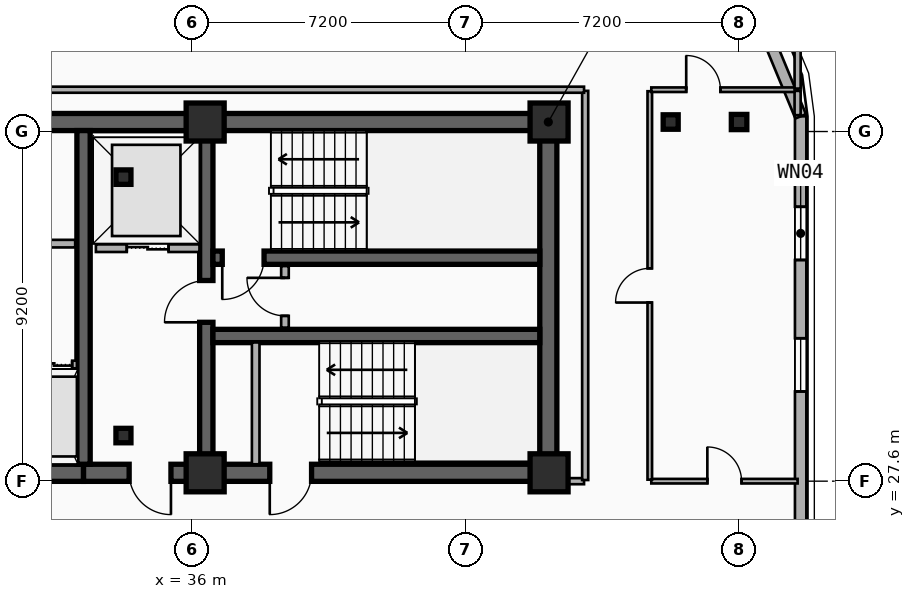
"""IFC4 building model, lengths in metres.
Left out: names, types, materials, properties, quantities, classifications, styles, units other than length and angle.
Written with IfcOpenShell. Run it as: python <this file> out.ifc"""

import sys

from ifc_helpers import new_model, si_unit, direction, frame, frame_2d, origin, origin_2d, place, context, subcontext, project, spatial, rectangle, i_section, extrude, element, fill, save


model = new_model("IFC4")
c1 = context("Model", 3, precision=1e-05, world=origin(), true_north=direction((0.0, 1.0)))
c2 = subcontext(c1, "Body", "Model", "MODEL_VIEW")
j1 = project(units=[si_unit("LENGTHUNIT", "METRE"), si_unit("PLANEANGLEUNIT", "RADIAN")], contexts=[c1])
p1 = place(None, origin())
s1 = spatial("IfcSite", under=j1, at=p1, CompositionType="ELEMENT")
p2 = place(p1, origin())
s2 = spatial("IfcBuilding", under=s1, at=p2, CompositionType="ELEMENT")
p3 = place(p2, frame((0.0, 0.0, 236.4)))
s3 = spatial("IfcBuildingStorey", under=s2, at=p3, CompositionType="ELEMENT", Elevation=236.4)
p4 = place(p3, frame((12.15, 37.05, 0.0), z_axis=(0.0, 0.0, 1.0), x_axis=(1.0, 0.0, 0.0)))
e1 = element("IfcWall", 1, at=p4, inside=s3, PredefinedType="SHEAR", context=c2, shape_type="SweptSolid", body=[
    extrude(rectangle(XDim=33.23, YDim=0.45, at=frame_2d((16.615, 0.0))), origin(), (0.0, 0.0, 1.0), 3.6),
])
p5 = place(p3, frame((33.15, 27.82, 0.0), z_axis=(0.0, 0.0, 1.0), x_axis=(-1.0, 0.0, 0.0)))
e2 = element("IfcWall", 2, at=p5, inside=s3, PredefinedType="SHEAR", context=c2, shape_type="SweptSolid", body=[
    extrude(rectangle(XDim=11.97, YDim=0.45, at=frame_2d((5.985, 0.0))), origin(), (0.0, 0.0, 1.0), 3.6),
])
p6 = place(p5, frame((6.1, 0.0, 0.0)))
e3 = element("IfcOpeningElement", 3, at=p6, cuts=e2, PredefinedType="OPENING", context=c2, shape_type="SweptSolid", body=[
    extrude(rectangle(XDim=1.6, YDim=2.2, at=frame_2d((0.8, 1.1))), frame((0.0, 0.235, 0.0), z_axis=(0.0, -1.0, 0.0), x_axis=(1.0, 0.0, 0.0)), (0.0, 0.0, 1.0), 0.47),
])
p7 = place(p3, frame((45.38, 27.82, 0.0), z_axis=(0.0, 0.0, 1.0), x_axis=(-1.0, 0.0, 0.0)))
e4 = element("IfcWall", 4, at=p7, inside=s3, PredefinedType="SHEAR", context=c2, shape_type="SweptSolid", body=[
    extrude(rectangle(XDim=12.23, YDim=0.45, at=frame_2d((6.115, 0.0))), origin(), (0.0, 0.0, 1.0), 3.6),
])
p8 = place(p7, frame((9.93, 0.0, 0.0)))
e5 = element("IfcOpeningElement", 5, at=p8, cuts=e4, PredefinedType="OPENING", context=c2, shape_type="SweptSolid", body=[
    extrude(rectangle(XDim=1.1, YDim=2.15, at=frame_2d((0.55, 1.075))), frame((0.0, 0.235, 0.0), z_axis=(0.0, -1.0, 0.0), x_axis=(1.0, 0.0, 0.0)), (0.0, 0.0, 1.0), 0.47),
])
p9 = place(p7, frame((6.23, 0.0, 0.0)))
e6 = element("IfcOpeningElement", 6, at=p9, cuts=e4, PredefinedType="OPENING", context=c2, shape_type="SweptSolid", body=[
    extrude(rectangle(XDim=1.1, YDim=2.15, at=frame_2d((0.55, 1.075))), frame((0.0, 0.235, 0.0), z_axis=(0.0, -1.0, 0.0), x_axis=(1.0, 0.0, 0.0)), (0.0, 0.0, 1.0), 0.47),
])
p10 = place(p3, frame((45.38, 28.045, 0.0), z_axis=(0.0, 0.0, 1.0), x_axis=(0.0, 1.0, 0.0)))
e7 = element("IfcWall", 7, at=p10, inside=s3, PredefinedType="SHEAR", context=c2, shape_type="SweptSolid", body=[
    extrude(rectangle(XDim=8.78, YDim=0.45, at=frame_2d((4.39, 0.0))), origin(), (0.0, 0.0, 1.0), 3.6),
])
p11 = place(p3, frame((33.15, 28.045, 0.0), z_axis=(0.0, 0.0, 1.0), x_axis=(0.0, 1.0, 0.0)))
e8 = element("IfcWall", 8, at=p11, inside=s3, PredefinedType="SHEAR", context=c2, shape_type="SweptSolid", body=[
    extrude(rectangle(XDim=8.78, YDim=0.35, at=frame_2d((4.39, 0.0))), origin(), (0.0, 0.0, 1.0), 3.6),
])
p12 = place(p3, frame((36.38, 28.045, 0.0), z_axis=(0.0, 0.0, 1.0), x_axis=(0.0, 1.0, 0.0)))
e9 = element("IfcWall", 9, at=p12, inside=s3, PredefinedType="SHEAR", context=c2, shape_type="SweptSolid", body=[
    extrude(rectangle(XDim=8.78, YDim=0.35, at=frame_2d((4.39, 0.0))), origin(), (0.0, 0.0, 1.0), 3.6),
])
p13 = place(p12, frame((3.735, 0.0, 0.0)))
e10 = element("IfcOpeningElement", 10, at=p13, cuts=e9, PredefinedType="OPENING", context=c2, shape_type="SweptSolid", body=[
    extrude(rectangle(XDim=1.1, YDim=2.15, at=frame_2d((0.55, 1.075))), frame((0.0, 0.185, 0.0), z_axis=(0.0, -1.0, 0.0), x_axis=(1.0, 0.0, 0.0)), (0.0, 0.0, 1.0), 0.37),
])
p14 = place(p3, frame((45.155, 33.48, 0.0), z_axis=(0.0, 0.0, 1.0), x_axis=(-1.0, 0.0, 0.0)))
e11 = element("IfcWall", 11, at=p14, inside=s3, PredefinedType="SHEAR", context=c2, shape_type="SweptSolid", body=[
    extrude(rectangle(XDim=8.6, YDim=0.35, at=frame_2d((4.3, 0.0))), origin(), (0.0, 0.0, 1.0), 3.6),
])
p15 = place(p14, frame((7.255, 0.0, 0.0)))
e12 = element("IfcOpeningElement", 12, at=p15, cuts=e11, PredefinedType="OPENING", context=c2, shape_type="SweptSolid", body=[
    extrude(rectangle(XDim=1.1, YDim=2.15, at=frame_2d((0.55, 1.075))), frame((0.0, 0.185, 0.0), z_axis=(0.0, -1.0, 0.0), x_axis=(1.0, 0.0, 0.0)), (0.0, 0.0, 1.0), 0.37),
])
p16 = place(p3, frame((36.555, 31.42, 0.0), z_axis=(0.0, 0.0, 1.0), x_axis=(1.0, 0.0, 0.0)))
e13 = element("IfcWall", 13, at=p16, inside=s3, PredefinedType="SHEAR", context=c2, shape_type="SweptSolid", body=[
    extrude(rectangle(XDim=8.6, YDim=0.35, at=frame_2d((4.3, 0.0))), origin(), (0.0, 0.0, 1.0), 3.6),
])
for number, where, z_axis, x_axis in (
    (14, (34.2, 28.8, 0.0), (0.0, 0.0, 1.0), (1.0, 0.0, 0.0)),
    (15, (34.2, 35.6, 0.0), (0.0, 0.0, 1.0), (1.0, 0.0, 0.0)),
):
    element("IfcColumn", number, at=place(p3, frame(where, z_axis=z_axis, x_axis=x_axis)), inside=s3, PredefinedType="COLUMN", context=c2, shape_type="SweptSolid", body=[
        extrude(i_section(OverallWidth=0.395, OverallDepth=0.38, WebThickness=0.019, FlangeThickness=0.03, FilletRadius=0.015, at=origin_2d()), origin(), (0.0, 0.0, 1.0), 3.6),
    ])
for number, where, z_axis, x_axis in (
    (16, (36.35, 27.82, 0.0), (0.0, 0.0, 1.0), (1.0, 0.0, 0.0)),
    (17, (36.35, 37.05, 0.0), (0.0, 0.0, 1.0), (1.0, 0.0, 0.0)),
    (18, (45.4, 27.82, 0.0), (0.0, 0.0, 1.0), (1.0, 0.0, 0.0)),
    (19, (45.4, 37.05, 0.0), (0.0, 0.0, 1.0), (1.0, 0.0, 0.0)),
):
    element("IfcColumn", number, at=place(p3, frame(where, z_axis=z_axis, x_axis=x_axis)), inside=s3, PredefinedType="COLUMN", context=c2, shape_type="SweptSolid", body=[
        extrude(rectangle(XDim=1.0, YDim=1.0, at=origin_2d()), origin(), (0.0, 0.0, 1.0), 3.6),
    ])
p17 = place(p3, frame((48.6, 37.05, 0.0), z_axis=(0.0, 0.0, 1.0), x_axis=(1.0, 0.0, 0.0)))
e20 = element("IfcColumn", 20, at=p17, inside=s3, PredefinedType="COLUMN", context=c2, shape_type="SweptSolid", body=[
    extrude(i_section(OverallWidth=0.395, OverallDepth=0.38, WebThickness=0.019, FlangeThickness=0.03, FilletRadius=0.015, at=origin_2d()), origin(), (0.0, 0.0, 1.0), 3.6),
])
p18 = place(p3, frame((50.4, 37.05, 0.0), z_axis=(0.0, 0.0, 1.0), x_axis=(1.0, 0.0, 0.0)))
e21 = element("IfcColumn", 21, at=p18, inside=s3, PredefinedType="COLUMN", context=c2, shape_type="SweptSolid", body=[
    extrude(i_section(OverallWidth=0.408, OverallDepth=0.4, WebThickness=0.025, FlangeThickness=0.039, FilletRadius=0.015, at=origin_2d()), origin(), (0.0, 0.0, 1.0), 3.6),
])
p19 = place(p3, frame((52.02, 37.2, 0.0), z_axis=(0.0, 0.0, 1.0), x_axis=(0.0, -1.0, 0.0)))
e22 = element("IfcWall", 22, at=p19, inside=s3, PredefinedType="SOLIDWALL", context=c2, shape_type="SweptSolid", body=[
    extrude(rectangle(XDim=28.6, YDim=0.3, at=frame_2d((14.3, 0.0))), origin(), (0.0, 0.0, 1.0), 3.34),
])
p20 = place(p19, frame((2.38, 0.0, 0.34)))
e23 = element("IfcOpeningElement", 23, at=p20, cuts=e22, PredefinedType="OPENING", context=c2, shape_type="SweptSolid", body=[
    extrude(rectangle(XDim=1.4, YDim=2.1, at=frame_2d((0.7, 1.05))), frame((0.0, 0.16, 0.0), z_axis=(0.0, -1.0, 0.0), x_axis=(1.0, 0.0, 0.0)), (0.0, 0.0, 1.0), 0.32),
])
p21 = place(p19, frame((5.84, 0.0, 0.34)))
e24 = element("IfcOpeningElement", 24, at=p21, cuts=e22, PredefinedType="OPENING", context=c2, shape_type="SweptSolid", body=[
    extrude(rectangle(XDim=1.4, YDim=2.1, at=frame_2d((0.7, 1.05))), frame((0.0, 0.16, 0.0), z_axis=(0.0, -1.0, 0.0), x_axis=(1.0, 0.0, 0.0)), (0.0, 0.0, 1.0), 0.32),
])
p22 = place(p19, frame((24.529, 0.0, 0.34)))
e25 = element("IfcOpeningElement", 25, at=p22, cuts=e22, PredefinedType="OPENING", context=c2, shape_type="SweptSolid", body=[
    extrude(rectangle(XDim=1.4, YDim=2.1, at=frame_2d((0.7, 1.05))), frame((0.0, 0.16, 0.0), z_axis=(0.0, -1.0, 0.0), x_axis=(1.0, 0.0, 0.0)), (0.0, 0.0, 1.0), 0.32),
])
p23 = place(p19, frame((20.521, 0.0, 0.34)))
e26 = element("IfcOpeningElement", 26, at=p23, cuts=e22, PredefinedType="OPENING", context=c2, shape_type="SweptSolid", body=[
    extrude(rectangle(XDim=1.4, YDim=2.1, at=frame_2d((0.7, 1.05))), frame((0.0, 0.16, 0.0), z_axis=(0.0, -1.0, 0.0), x_axis=(1.0, 0.0, 0.0)), (0.0, 0.0, 1.0), 0.32),
])
p24 = place(p19, frame((16.733, 0.0, 0.34)))
e27 = element("IfcOpeningElement", 27, at=p24, cuts=e22, PredefinedType="OPENING", context=c2, shape_type="SweptSolid", body=[
    extrude(rectangle(XDim=1.4, YDim=2.1, at=frame_2d((0.7, 1.05))), frame((0.0, 0.16, 0.0), z_axis=(0.0, -1.0, 0.0), x_axis=(1.0, 0.0, 0.0)), (0.0, 0.0, 1.0), 0.32),
])
p25 = place(p19, frame((12.945, 0.0, 0.34)))
e28 = element("IfcOpeningElement", 28, at=p25, cuts=e22, PredefinedType="OPENING", context=c2, shape_type="SweptSolid", body=[
    extrude(rectangle(XDim=1.4, YDim=2.1, at=frame_2d((0.7, 1.05))), frame((0.0, 0.16, 0.0), z_axis=(0.0, -1.0, 0.0), x_axis=(1.0, 0.0, 0.0)), (0.0, 0.0, 1.0), 0.32),
])
p26 = place(p3, frame((50.843, 40.042, 0.0), z_axis=(0.0, 0.0, 1.0), x_axis=(0.382704529509, -0.923870793506, 0.0)))
e29 = element("IfcWall", 29, at=p26, inside=s3, PredefinedType="SOLIDWALL", context=c2, shape_type="SweptSolid", body=[
    extrude(rectangle(XDim=3.077, YDim=0.3, at=frame_2d((1.538, 0.0))), origin(), (0.0, 0.0, 1.0), 3.34),
])
p27 = place(p3, frame((33.475, 33.73, 0.0), z_axis=(0.0, 0.0, 1.0), x_axis=(1.0, 0.0, 0.0)))
e30 = element("IfcWall", 30, at=p27, inside=s3, PredefinedType="PARTITIONING", context=c2, shape_type="SweptSolid", body=[
    extrude(rectangle(XDim=2.725, YDim=0.2, at=frame_2d((1.362, 0.0))), origin(), (0.0, 0.0, 1.0), 2.41),
])
p28 = place(p27, frame((0.812, 0.0, 0.0)))
e31 = element("IfcOpeningElement", 31, at=p28, cuts=e30, PredefinedType="OPENING", context=c2, shape_type="SweptSolid", body=[
    extrude(rectangle(XDim=1.1, YDim=2.15, at=frame_2d((0.55, 1.075))), frame((0.0, 0.11, 0.0), z_axis=(0.0, -1.0, 0.0), x_axis=(1.0, 0.0, 0.0)), (0.0, 0.0, 1.0), 0.22),
])
p29 = place(p3, frame((31.775, 30.67, 0.0), z_axis=(0.0, 0.0, 1.0), x_axis=(1.0, 0.0, 0.0)))
e32 = element("IfcWall", 32, at=p29, inside=s3, PredefinedType="PARTITIONING", context=c2, shape_type="SweptSolid", body=[
    extrude(rectangle(XDim=1.2, YDim=0.2, at=frame_2d((0.6, 0.0))), origin(), (0.0, 0.0, 1.0), 2.72),
])
p30 = place(p29, frame((0.125, 0.0, 0.0)))
e33 = element("IfcOpeningElement", 33, at=p30, cuts=e32, PredefinedType="OPENING", context=c2, shape_type="SweptSolid", body=[
    extrude(rectangle(XDim=0.95, YDim=2.15, at=frame_2d((0.475, 1.075))), frame((0.0, 0.11, 0.0), z_axis=(0.0, -1.0, 0.0), x_axis=(1.0, 0.0, 0.0)), (0.0, 0.0, 1.0), 0.22),
])
p31 = place(p3, frame((37.68, 28.045, 0.0), z_axis=(0.0, 0.0, 1.0), x_axis=(0.0, 1.0, 0.0)))
e34 = element("IfcWall", 34, at=p31, inside=s3, PredefinedType="PARTITIONING", context=c2, shape_type="SweptSolid", body=[
    extrude(rectangle(XDim=3.205, YDim=0.2, at=frame_2d((1.603, 0.0))), origin(), (0.0, 0.0, 1.0), 2.72),
])
p32 = place(p3, frame((38.45, 31.64, 0.0), z_axis=(0.0, 0.0, 1.0), x_axis=(0.0, 1.0, 0.0)))
e35 = element("IfcWall", 35, at=p32, inside=s3, PredefinedType="PARTITIONING", context=c2, shape_type="SweptSolid", body=[
    extrude(rectangle(XDim=1.62, YDim=0.2, at=frame_2d((0.81, 0.0))), origin(), (0.0, 0.0, 1.0), 3.34),
])
p33 = place(p32, frame((0.31, 0.0, 0.0)))
e36 = element("IfcOpeningElement", 36, at=p33, cuts=e35, PredefinedType="OPENING", context=c2, shape_type="SweptSolid", body=[
    extrude(rectangle(XDim=1.0, YDim=2.15, at=frame_2d((0.5, 1.075))), frame((0.0, 0.11, 0.0), z_axis=(0.0, -1.0, 0.0), x_axis=(1.0, 0.0, 0.0)), (0.0, 0.0, 1.0), 0.22),
])
p34 = place(p3, frame((21.59, 33.85, 0.0), z_axis=(0.0, 0.0, 1.0), x_axis=(1.0, 0.0, 0.0)))
e37 = element("IfcWall", 37, at=p34, inside=s3, PredefinedType="PARTITIONING", context=c2, shape_type="SweptSolid", body=[
    extrude(rectangle(XDim=11.34, YDim=0.2, at=frame_2d((5.67, 0.0))), origin(), (0.0, 0.0, 1.0), 2.41),
])
p35 = place(p34, frame((5.07, 0.0, 0.0)))
e38 = element("IfcOpeningElement", 38, at=p35, cuts=e37, PredefinedType="OPENING", context=c2, shape_type="SweptSolid", body=[
    extrude(rectangle(XDim=1.2, YDim=2.15, at=frame_2d((0.6, 1.075))), frame((0.0, 0.11, 0.0), z_axis=(0.0, -1.0, 0.0), x_axis=(1.0, 0.0, 0.0)), (0.0, 0.0, 1.0), 0.22),
])
p36 = place(p3, frame((48.09, 27.6, 0.0), z_axis=(0.0, 0.0, 1.0), x_axis=(1.0, 0.0, 0.0)))
e39 = element("IfcWall", 39, at=p36, inside=s3, PredefinedType="PARTITIONING", context=c2, shape_type="SweptSolid", body=[
    extrude(rectangle(XDim=3.85, YDim=0.12, at=frame_2d((1.925, 0.0))), origin(), (0.0, 0.0, 1.0), 2.67),
])
p37 = place(p36, frame((1.475, 0.0, 0.0)))
e40 = element("IfcOpeningElement", 40, at=p37, cuts=e39, PredefinedType="OPENING", context=c2, shape_type="SweptSolid", body=[
    extrude(rectangle(XDim=0.9, YDim=2.1, at=frame_2d((0.45, 1.05))), frame((0.0, 0.07, 0.0), z_axis=(0.0, -1.0, 0.0), x_axis=(1.0, 0.0, 0.0)), (0.0, 0.0, 1.0), 0.14),
])
p38 = place(p3, frame((48.05, 27.64, 0.0), z_axis=(0.0, 0.0, 1.0), x_axis=(0.0, 1.0, 0.0)))
e41 = element("IfcWall", 41, at=p38, inside=s3, PredefinedType="PARTITIONING", context=c2, shape_type="SweptSolid", body=[
    extrude(rectangle(XDim=10.22, YDim=0.12, at=frame_2d((5.11, 0.0))), origin(), (0.0, 0.0, 1.0), 2.82),
])
p39 = place(p38, frame((4.66, 0.0, 0.0)))
e42 = element("IfcOpeningElement", 42, at=p39, cuts=e41, PredefinedType="OPENING", context=c2, shape_type="SweptSolid", body=[
    extrude(rectangle(XDim=0.9, YDim=2.1, at=frame_2d((0.45, 1.05))), frame((0.0, 0.07, 0.0), z_axis=(0.0, -1.0, 0.0), x_axis=(1.0, 0.0, 0.0)), (0.0, 0.0, 1.0), 0.14),
])
p40 = place(p3, frame((48.09, 37.9, 0.0), z_axis=(0.0, 0.0, 1.0), x_axis=(1.0, 0.0, 0.0)))
e43 = element("IfcWall", 43, at=p40, inside=s3, PredefinedType="PARTITIONING", context=c2, shape_type="SweptSolid", body=[
    extrude(rectangle(XDim=3.85, YDim=0.12, at=frame_2d((1.925, 0.0))), origin(), (0.0, 0.0, 1.0), 3.34),
])
p41 = place(p40, frame((0.919, 0.0, 0.0)))
e44 = element("IfcOpeningElement", 44, at=p41, cuts=e43, PredefinedType="OPENING", context=c2, shape_type="SweptSolid", body=[
    extrude(rectangle(XDim=0.9, YDim=2.1, at=frame_2d((0.45, 1.05))), frame((0.0, 0.07, 0.0), z_axis=(0.0, -1.0, 0.0), x_axis=(1.0, 0.0, 0.0)), (0.0, 0.0, 1.0), 0.14),
])
p42 = place(p3, frame((45.41, 27.6, 0.0), z_axis=(0.0, 0.0, 1.0), x_axis=(1.0, 0.0, 0.0)))
e45 = element("IfcWall", 45, at=p42, inside=s3, PredefinedType="PARTITIONING", context=c2, shape_type="SweptSolid", body=[
    extrude(rectangle(XDim=0.91, YDim=0.16, at=frame_2d((0.455, 0.0))), origin(), (0.0, 0.0, 1.0), 2.41),
])
p43 = place(p3, frame((46.35, 27.63, 0.0), z_axis=(0.0, 0.0, 1.0), x_axis=(0.0, 1.0, 0.0)))
e46 = element("IfcWall", 46, at=p43, inside=s3, PredefinedType="PARTITIONING", context=c2, shape_type="SweptSolid", body=[
    extrude(rectangle(XDim=10.24, YDim=0.16, at=frame_2d((5.12, 0.0))), origin(), (0.0, 0.0, 1.0), 2.82),
])
p44 = place(p3, frame((11.28, 37.9, 0.0), z_axis=(0.0, 0.0, 1.0), x_axis=(1.0, 0.0, 0.0)))
e47 = element("IfcWall", 47, at=p44, inside=s3, PredefinedType="PARTITIONING", context=c2, shape_type="SweptSolid", body=[
    extrude(rectangle(XDim=35.04, YDim=0.16, at=frame_2d((17.52, 0.0))), origin(), (0.0, 0.0, 1.0), 3.34),
])
p45 = place(p3, frame((51.94, 37.93, 0.0), z_axis=(0.0, 0.0, 1.0), x_axis=(0.0, 1.0, 0.0)))
e48 = element("IfcWall", 48, at=p45, inside=s3, PredefinedType="PARTITIONING", context=c2, shape_type="SweptSolid", body=[
    extrude(rectangle(XDim=1.44, YDim=0.16, at=frame_2d((0.72, 0.0))), origin(), (0.0, 0.0, 1.0), 3.34),
])
p46 = place(p3, frame((51.94, 37.23, 0.0), z_axis=(0.0, 0.0, 1.0), x_axis=(0.0, 1.0, 0.0)))
e49 = element("IfcWall", 49, at=p46, inside=s3, PredefinedType="PARTITIONING", context=c2, shape_type="SweptSolid", body=[
    extrude(rectangle(XDim=0.64, YDim=0.16, at=frame_2d((0.32, 0.0))), origin(), (0.0, 0.0, 1.0), 3.34),
])
p47 = place(p20, origin())
e50 = element("IfcWindow", 50, at=p47, inside=s3, PartitioningType="SINGLE_PANEL", PredefinedType="WINDOW", context=c2, shape_type="SweptSolid", body=[
    extrude(rectangle(XDim=1.4, YDim=2.1, at=frame_2d((0.7, 1.05))), frame((0.0, 0.03, 0.0), z_axis=(0.0, -1.0, 0.0), x_axis=(1.0, 0.0, 0.0)), (0.0, 0.0, 1.0), 0.06),
])
fill(e23, e50)
p48 = place(p21, origin())
e51 = element("IfcWindow", 51, at=p48, inside=s3, PartitioningType="SINGLE_PANEL", PredefinedType="WINDOW", context=c2, shape_type="SweptSolid", body=[
    extrude(rectangle(XDim=1.4, YDim=2.1, at=frame_2d((0.7, 1.05))), frame((0.0, 0.03, 0.0), z_axis=(0.0, -1.0, 0.0), x_axis=(1.0, 0.0, 0.0)), (0.0, 0.0, 1.0), 0.06),
])
fill(e24, e51)
p49 = place(p28, origin())
e52 = element("IfcDoor", 52, at=p49, inside=s3, OperationType="DOUBLE_DOOR_SLIDING", PredefinedType="DOOR", context=c2, shape_type="SweptSolid", body=[
    extrude(rectangle(XDim=1.1, YDim=2.15, at=frame_2d((0.55, 1.075))), frame((0.0, 0.025, 0.0), z_axis=(0.0, -1.0, 0.0), x_axis=(1.0, 0.0, 0.0)), (0.0, 0.0, 1.0), 0.05),
])
fill(e31, e52)
p50 = place(p30, origin())
e53 = element("IfcDoor", 53, at=p50, inside=s3, OperationType="DOUBLE_DOOR_SLIDING", PredefinedType="DOOR", context=c2, shape_type="SweptSolid", body=[
    extrude(rectangle(XDim=0.95, YDim=2.15, at=frame_2d((0.475, 1.075))), frame((0.0, 0.025, 0.0), z_axis=(0.0, -1.0, 0.0), x_axis=(1.0, 0.0, 0.0)), (0.0, 0.0, 1.0), 0.05),
])
fill(e33, e53)
p51 = place(p15, origin())
e54 = element("IfcDoor", 54, at=p51, inside=s3, OperationType="SINGLE_SWING_RIGHT", PredefinedType="DOOR", context=c2, shape_type="SweptSolid", body=[
    extrude(rectangle(XDim=1.1, YDim=2.15, at=frame_2d((0.55, 1.075))), frame((0.0, 0.025, 0.0), z_axis=(0.0, -1.0, 0.0), x_axis=(1.0, 0.0, 0.0)), (0.0, 0.0, 1.0), 0.05),
])
fill(e12, e54)
p52 = place(p13, origin())
e55 = element("IfcDoor", 55, at=p52, inside=s3, OperationType="SINGLE_SWING_LEFT", PredefinedType="DOOR", context=c2, shape_type="SweptSolid", body=[
    extrude(rectangle(XDim=1.1, YDim=2.15, at=frame_2d((0.55, 1.075))), frame((0.0, 0.025, 0.0), z_axis=(0.0, -1.0, 0.0), x_axis=(1.0, 0.0, 0.0)), (0.0, 0.0, 1.0), 0.05),
])
fill(e10, e55)
p53 = place(p8, origin())
e56 = element("IfcDoor", 56, at=p53, inside=s3, OperationType="SINGLE_SWING_LEFT", PredefinedType="DOOR", context=c2, shape_type="SweptSolid", body=[
    extrude(rectangle(XDim=1.1, YDim=2.15, at=frame_2d((0.55, 1.075))), frame((0.0, 0.025, 0.0), z_axis=(0.0, -1.0, 0.0), x_axis=(1.0, 0.0, 0.0)), (0.0, 0.0, 1.0), 0.05),
])
fill(e5, e56)
p54 = place(p9, origin())
e57 = element("IfcDoor", 57, at=p54, inside=s3, OperationType="SINGLE_SWING_RIGHT", PredefinedType="DOOR", context=c2, shape_type="SweptSolid", body=[
    extrude(rectangle(XDim=1.1, YDim=2.15, at=frame_2d((0.55, 1.075))), frame((0.0, 0.025, 0.0), z_axis=(0.0, -1.0, 0.0), x_axis=(1.0, 0.0, 0.0)), (0.0, 0.0, 1.0), 0.05),
])
fill(e6, e57)
p55 = place(p33, origin())
e58 = element("IfcDoor", 58, at=p55, inside=s3, OperationType="SINGLE_SWING_RIGHT", PredefinedType="DOOR", context=c2, shape_type="SweptSolid", body=[
    extrude(rectangle(XDim=1.0, YDim=2.15, at=frame_2d((0.5, 1.075))), frame((0.0, 0.025, 0.0), z_axis=(0.0, -1.0, 0.0), x_axis=(1.0, 0.0, 0.0)), (0.0, 0.0, 1.0), 0.05),
])
fill(e36, e58)
p56 = place(p37, origin())
e59 = element("IfcDoor", 59, at=p56, inside=s3, OperationType="SINGLE_SWING_LEFT", PredefinedType="DOOR", context=c2, shape_type="SweptSolid", body=[
    extrude(rectangle(XDim=0.9, YDim=2.1, at=frame_2d((0.45, 1.05))), frame((0.0, 0.025, 0.0), z_axis=(0.0, -1.0, 0.0), x_axis=(1.0, 0.0, 0.0)), (0.0, 0.0, 1.0), 0.05),
])
fill(e40, e59)
p57 = place(p39, origin())
e60 = element("IfcDoor", 60, at=p57, inside=s3, OperationType="SINGLE_SWING_LEFT", PredefinedType="DOOR", context=c2, shape_type="SweptSolid", body=[
    extrude(rectangle(XDim=0.9, YDim=2.1, at=frame_2d((0.45, 1.05))), frame((0.0, 0.025, 0.0), z_axis=(0.0, -1.0, 0.0), x_axis=(1.0, 0.0, 0.0)), (0.0, 0.0, 1.0), 0.05),
])
fill(e42, e60)
p58 = place(p41, origin())
e61 = element("IfcDoor", 61, at=p58, inside=s3, OperationType="SINGLE_SWING_LEFT", PredefinedType="DOOR", context=c2, shape_type="SweptSolid", body=[
    extrude(rectangle(XDim=0.9, YDim=2.1, at=frame_2d((0.45, 1.05))), frame((0.0, 0.025, 0.0), z_axis=(0.0, -1.0, 0.0), x_axis=(1.0, 0.0, 0.0)), (0.0, 0.0, 1.0), 0.05),
])
fill(e44, e61)
save(model, sys.argv[1])
